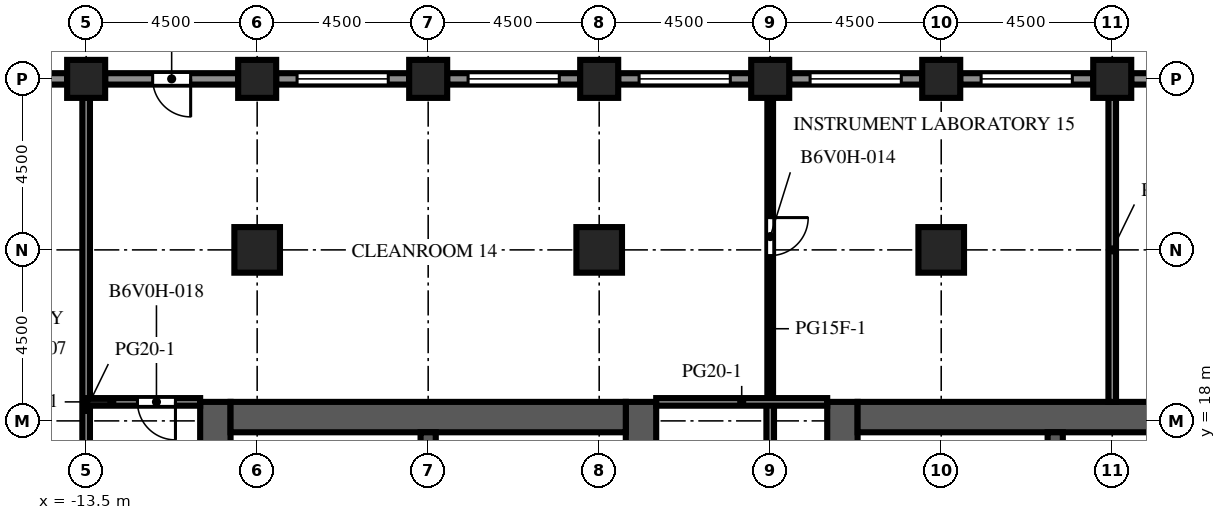
"""IFC4 building model, lengths in metres.
Left out: names, types, materials, properties, quantities, classifications, styles, units other than length and angle.
Written with IfcOpenShell. Run it as: python <this file> out.ifc"""

import sys

from ifc_helpers import new_model, si_unit, direction, frame, frame_2d, origin, origin_2d, place, context, subcontext, project, spatial, rectangle, extrude, element, fill, save


model = new_model("IFC4")
c1 = context("Model", 3, precision=1e-05, world=origin(), true_north=direction((0.0, 1.0)))
c2 = subcontext(c1, "Body", "Model", "MODEL_VIEW")
j1 = project(units=[si_unit("LENGTHUNIT", "METRE"), si_unit("PLANEANGLEUNIT", "RADIAN")], contexts=[c1])
p1 = place(None, origin())
s1 = spatial("IfcSite", under=j1, at=p1, CompositionType="ELEMENT")
p2 = place(p1, origin())
s2 = spatial("IfcBuilding", under=s1, at=p2, CompositionType="ELEMENT")
p3 = place(p2, frame((0.0, 0.0, 191.5)))
s3 = spatial("IfcBuildingStorey", under=s2, at=p3, CompositionType="ELEMENT", Elevation=191.5)
for number, where, z_axis, x_axis in (
    (1, (-13.5, 27.0, 0.0), (0.0, 0.0, 1.0), (1.0, 0.0, 0.0)),
    (2, (-9.0, 27.0, 0.0), (0.0, 0.0, 1.0), (1.0, 0.0, 0.0)),
    (3, (-4.5, 27.0, 0.0), (0.0, 0.0, 1.0), (1.0, 0.0, 0.0)),
    (4, (0.0, 27.0, 0.0), (0.0, 0.0, 1.0), (1.0, 0.0, 0.0)),
    (5, (4.5, 27.0, 0.0), (0.0, 0.0, 1.0), (1.0, 0.0, 0.0)),
    (6, (9.0, 27.0, 0.0), (0.0, 0.0, 1.0), (1.0, 0.0, 0.0)),
    (7, (13.5, 27.0, 0.0), (0.0, 0.0, 1.0), (1.0, 0.0, 0.0)),
):
    element("IfcColumn", number, at=place(p3, frame(where, z_axis=z_axis, x_axis=x_axis)), inside=s3, PredefinedType="COLUMN", context=c2, shape_type="SweptSolid", body=[
        extrude(rectangle(XDim=1.0, YDim=1.0, at=origin_2d()), origin(), (0.0, 0.0, 1.0), 4.1),
    ])
for number, where, z_axis, x_axis in (
    (8, (-9.0, 22.5, 0.0), (0.0, 0.0, 1.0), (1.0, 0.0, 0.0)),
    (9, (0.0, 22.5, 0.0), (0.0, 0.0, 1.0), (1.0, 0.0, 0.0)),
    (10, (9.0, 22.5, 0.0), (0.0, 0.0, 1.0), (1.0, 0.0, 0.0)),
):
    element("IfcColumn", number, at=place(p3, frame(where, z_axis=z_axis, x_axis=x_axis)), inside=s3, PredefinedType="COLUMN", context=c2, shape_type="SweptSolid", body=[
        extrude(rectangle(XDim=1.2, YDim=1.2, at=origin_2d()), origin(), (0.0, 0.0, 1.0), 4.1),
    ])
p4 = place(p3, frame((-10.1, -9.0, 0.0), z_axis=(0.0, 0.0, 1.0), x_axis=(0.0, 1.0, 0.0)))
e11 = element("IfcWall", 11, at=p4, inside=s3, PredefinedType="SHEAR", context=c2, shape_type="SweptSolid", body=[
    extrude(rectangle(XDim=27.5, YDim=0.8, at=frame_2d((13.75, 0.0))), origin(), (0.0, 0.0, 1.0), 4.1),
])
p5 = place(p4, frame((12.55, 0.0, 0.0)))
e12 = element("IfcOpeningElement", 12, at=p5, cuts=e11, PredefinedType="OPENING", context=c2, shape_type="SweptSolid", body=[
    extrude(rectangle(XDim=2.4, YDim=2.4, at=frame_2d((1.2, 1.2))), frame((0.0, 0.41, 0.0), z_axis=(0.0, -1.0, 0.0), x_axis=(1.0, 0.0, 0.0)), (0.0, 0.0, 1.0), 0.82),
])
p6 = place(p4, frame((6.825, 0.0, 0.0)))
e13 = element("IfcOpeningElement", 13, at=p6, cuts=e11, PredefinedType="OPENING", context=c2, shape_type="SweptSolid", body=[
    extrude(rectangle(XDim=1.2, YDim=2.1, at=frame_2d((0.6, 1.05))), frame((0.0, 0.41, 0.0), z_axis=(0.0, -1.0, 0.0), x_axis=(1.0, 0.0, 0.0)), (0.0, 0.0, 1.0), 0.82),
])
p7 = place(p4, frame((19.475, 0.0, 0.0)))
e14 = element("IfcOpeningElement", 14, at=p7, cuts=e11, PredefinedType="OPENING", context=c2, shape_type="SweptSolid", body=[
    extrude(rectangle(XDim=1.2, YDim=2.1, at=frame_2d((0.6, 1.05))), frame((0.0, 0.41, 0.0), z_axis=(0.0, -1.0, 0.0), x_axis=(1.0, 0.0, 0.0)), (0.0, 0.0, 1.0), 0.82),
])
p8 = place(p3, frame((1.1, -9.0, 0.0), z_axis=(0.0, 0.0, 1.0), x_axis=(0.0, 1.0, 0.0)))
e15 = element("IfcWall", 15, at=p8, inside=s3, PredefinedType="SHEAR", context=c2, shape_type="SweptSolid", body=[
    extrude(rectangle(XDim=27.5, YDim=0.8, at=frame_2d((13.75, 0.0))), origin(), (0.0, 0.0, 1.0), 4.1),
])
p9 = place(p8, frame((12.55, 0.0, 0.0)))
e16 = element("IfcOpeningElement", 16, at=p9, cuts=e15, PredefinedType="OPENING", context=c2, shape_type="SweptSolid", body=[
    extrude(rectangle(XDim=2.4, YDim=2.4, at=frame_2d((1.2, 1.2))), frame((0.0, 0.41, 0.0), z_axis=(0.0, -1.0, 0.0), x_axis=(1.0, 0.0, 0.0)), (0.0, 0.0, 1.0), 0.82),
])
p10 = place(p8, frame((3.95, 0.0, 0.0)))
e17 = element("IfcOpeningElement", 17, at=p10, cuts=e15, PredefinedType="OPENING", context=c2, shape_type="SweptSolid", body=[
    extrude(rectangle(XDim=1.2, YDim=2.1, at=frame_2d((0.6, 1.05))), frame((0.0, 0.41, 0.0), z_axis=(0.0, -1.0, 0.0), x_axis=(1.0, 0.0, 0.0)), (0.0, 0.0, 1.0), 0.82),
])
p11 = place(p8, frame((19.45, 0.0, 0.0)))
e18 = element("IfcOpeningElement", 18, at=p11, cuts=e15, PredefinedType="OPENING", context=c2, shape_type="SweptSolid", body=[
    extrude(rectangle(XDim=1.0, YDim=2.1, at=frame_2d((0.5, 1.05))), frame((0.0, 0.41, 0.0), z_axis=(0.0, -1.0, 0.0), x_axis=(1.0, 0.0, 0.0)), (0.0, 0.0, 1.0), 0.82),
])
p12 = place(p8, frame((21.137, 0.0, 0.0)))
e19 = element("IfcOpeningElement", 19, at=p12, cuts=e15, PredefinedType="OPENING", context=c2, shape_type="SweptSolid", body=[
    extrude(rectangle(XDim=1.0, YDim=2.1, at=frame_2d((0.5, 1.05))), frame((0.0, 0.41, 0.0), z_axis=(0.0, -1.0, 0.0), x_axis=(1.0, 0.0, 0.0)), (0.0, 0.0, 1.0), 0.82),
])
p13 = place(p8, frame((23.2, 0.0, 0.0)))
e20 = element("IfcOpeningElement", 20, at=p13, cuts=e15, PredefinedType="OPENING", context=c2, shape_type="SweptSolid", body=[
    extrude(rectangle(XDim=1.0, YDim=2.1, at=frame_2d((0.5, 1.05))), frame((0.0, 0.41, 0.0), z_axis=(0.0, -1.0, 0.0), x_axis=(1.0, 0.0, 0.0)), (0.0, 0.0, 1.0), 0.82),
])
p14 = place(p8, frame((25.262, 0.0, 0.0)))
e21 = element("IfcOpeningElement", 21, at=p14, cuts=e15, PredefinedType="OPENING", context=c2, shape_type="SweptSolid", body=[
    extrude(rectangle(XDim=1.0, YDim=2.1, at=frame_2d((0.5, 1.05))), frame((0.0, 0.41, 0.0), z_axis=(0.0, -1.0, 0.0), x_axis=(1.0, 0.0, 0.0)), (0.0, 0.0, 1.0), 0.82),
])
p15 = place(p3, frame((-9.7, 18.1, 0.0), z_axis=(0.0, 0.0, 1.0), x_axis=(1.0, 0.0, 0.0)))
e22 = element("IfcWall", 22, at=p15, inside=s3, PredefinedType="SHEAR", context=c2, shape_type="SweptSolid", body=[
    extrude(rectangle(XDim=10.4, YDim=0.8, at=frame_2d((5.2, 0.0))), origin(), (0.0, 0.0, 1.0), 4.1),
])
p16 = place(p3, frame((-4.5, 10.2, 0.0), z_axis=(0.0, 0.0, 1.0), x_axis=(0.0, 1.0, 0.0)))
e23 = element("IfcWall", 23, at=p16, inside=s3, PredefinedType="SHEAR", context=c2, shape_type="SweptSolid", body=[
    extrude(rectangle(XDim=7.5, YDim=0.4, at=frame_2d((3.75, 0.0))), origin(), (0.0, 0.0, 1.0), 4.1),
])
p17 = place(p3, frame((6.4, -9.0, 0.0), z_axis=(0.0, 0.0, 1.0), x_axis=(0.0, 1.0, 0.0)))
e24 = element("IfcWall", 24, at=p17, inside=s3, PredefinedType="SHEAR", context=c2, shape_type="SweptSolid", body=[
    extrude(rectangle(XDim=27.5, YDim=0.8, at=frame_2d((13.75, 0.0))), origin(), (0.0, 0.0, 1.0), 4.1),
])
p18 = place(p17, frame((12.55, 0.0, 0.0)))
e25 = element("IfcOpeningElement", 25, at=p18, cuts=e24, PredefinedType="OPENING", context=c2, shape_type="SweptSolid", body=[
    extrude(rectangle(XDim=2.4, YDim=2.4, at=frame_2d((1.2, 1.2))), frame((0.0, 0.41, 0.0), z_axis=(0.0, -1.0, 0.0), x_axis=(1.0, 0.0, 0.0)), (0.0, 0.0, 1.0), 0.82),
])
p19 = place(p17, frame((3.95, 0.0, 0.0)))
e26 = element("IfcOpeningElement", 26, at=p19, cuts=e24, PredefinedType="OPENING", context=c2, shape_type="SweptSolid", body=[
    extrude(rectangle(XDim=1.2, YDim=2.1, at=frame_2d((0.6, 1.05))), frame((0.0, 0.41, 0.0), z_axis=(0.0, -1.0, 0.0), x_axis=(1.0, 0.0, 0.0)), (0.0, 0.0, 1.0), 0.82),
])
p20 = place(p17, frame((19.45, 0.0, 0.0)))
e27 = element("IfcOpeningElement", 27, at=p20, cuts=e24, PredefinedType="OPENING", context=c2, shape_type="SweptSolid", body=[
    extrude(rectangle(XDim=1.0, YDim=2.1, at=frame_2d((0.5, 1.05))), frame((0.0, 0.41, 0.0), z_axis=(0.0, -1.0, 0.0), x_axis=(1.0, 0.0, 0.0)), (0.0, 0.0, 1.0), 0.82),
])
p21 = place(p17, frame((21.137, 0.0, 0.0)))
e28 = element("IfcOpeningElement", 28, at=p21, cuts=e24, PredefinedType="OPENING", context=c2, shape_type="SweptSolid", body=[
    extrude(rectangle(XDim=1.0, YDim=2.1, at=frame_2d((0.5, 1.05))), frame((0.0, 0.41, 0.0), z_axis=(0.0, -1.0, 0.0), x_axis=(1.0, 0.0, 0.0)), (0.0, 0.0, 1.0), 0.82),
])
p22 = place(p17, frame((23.2, 0.0, 0.0)))
e29 = element("IfcOpeningElement", 29, at=p22, cuts=e24, PredefinedType="OPENING", context=c2, shape_type="SweptSolid", body=[
    extrude(rectangle(XDim=1.0, YDim=2.1, at=frame_2d((0.5, 1.05))), frame((0.0, 0.41, 0.0), z_axis=(0.0, -1.0, 0.0), x_axis=(1.0, 0.0, 0.0)), (0.0, 0.0, 1.0), 0.82),
])
p23 = place(p17, frame((25.262, 0.0, 0.0)))
e30 = element("IfcOpeningElement", 30, at=p23, cuts=e24, PredefinedType="OPENING", context=c2, shape_type="SweptSolid", body=[
    extrude(rectangle(XDim=1.0, YDim=2.1, at=frame_2d((0.5, 1.05))), frame((0.0, 0.41, 0.0), z_axis=(0.0, -1.0, 0.0), x_axis=(1.0, 0.0, 0.0)), (0.0, 0.0, 1.0), 0.82),
])
p24 = place(p3, frame((6.8, 18.1, 0.0), z_axis=(0.0, 0.0, 1.0), x_axis=(1.0, 0.0, 0.0)))
e31 = element("IfcWall", 31, at=p24, inside=s3, PredefinedType="SHEAR", context=c2, shape_type="SweptSolid", body=[
    extrude(rectangle(XDim=10.4, YDim=0.8, at=frame_2d((5.2, 0.0))), origin(), (0.0, 0.0, 1.0), 4.1),
])
p25 = place(p3, frame((12.0, 10.2, 0.0), z_axis=(0.0, 0.0, 1.0), x_axis=(0.0, 1.0, 0.0)))
e32 = element("IfcWall", 32, at=p25, inside=s3, PredefinedType="SHEAR", context=c2, shape_type="SweptSolid", body=[
    extrude(rectangle(XDim=7.5, YDim=0.4, at=frame_2d((3.75, 0.0))), origin(), (0.0, 0.0, 1.0), 4.1),
])
p26 = place(p3, frame((14.0, 27.0, 0.0), z_axis=(0.0, 0.0, 1.0), x_axis=(1.0, 0.0, 0.0)))
e33 = element("IfcWall", 33, at=p26, inside=s3, PredefinedType="SOLIDWALL", context=c2, shape_type="SweptSolid", body=[
    extrude(rectangle(XDim=3.5, YDim=0.3, at=frame_2d((1.75, 0.0))), origin(), (0.0, 0.0, 1.0), 2.85),
])
p27 = place(p26, frame((0.55, 0.0, 0.8)))
e34 = element("IfcOpeningElement", 34, at=p27, cuts=e33, PredefinedType="OPENING", context=c2, shape_type="SweptSolid", body=[
    extrude(rectangle(XDim=2.4, YDim=1.7, at=frame_2d((1.2, 0.85))), frame((0.0, 0.16, 0.0), z_axis=(0.0, -1.0, 0.0), x_axis=(1.0, 0.0, 0.0)), (0.0, 0.0, 1.0), 0.32),
])
p28 = place(p3, frame((9.5, 27.0, 0.0), z_axis=(0.0, 0.0, 1.0), x_axis=(1.0, 0.0, 0.0)))
e35 = element("IfcWall", 35, at=p28, inside=s3, PredefinedType="SOLIDWALL", context=c2, shape_type="SweptSolid", body=[
    extrude(rectangle(XDim=3.5, YDim=0.3, at=frame_2d((1.75, 0.0))), origin(), (0.0, 0.0, 1.0), 2.85),
])
p29 = place(p28, frame((0.55, 0.0, 0.8)))
e36 = element("IfcOpeningElement", 36, at=p29, cuts=e35, PredefinedType="OPENING", context=c2, shape_type="SweptSolid", body=[
    extrude(rectangle(XDim=2.4, YDim=1.7, at=frame_2d((1.2, 0.85))), frame((0.0, 0.16, 0.0), z_axis=(0.0, -1.0, 0.0), x_axis=(1.0, 0.0, 0.0)), (0.0, 0.0, 1.0), 0.32),
])
p30 = place(p3, frame((5.0, 27.0, 0.0), z_axis=(0.0, 0.0, 1.0), x_axis=(1.0, 0.0, 0.0)))
e37 = element("IfcWall", 37, at=p30, inside=s3, PredefinedType="SOLIDWALL", context=c2, shape_type="SweptSolid", body=[
    extrude(rectangle(XDim=3.5, YDim=0.3, at=frame_2d((1.75, 0.0))), origin(), (0.0, 0.0, 1.0), 2.85),
])
p31 = place(p30, frame((0.55, 0.0, 0.8)))
e38 = element("IfcOpeningElement", 38, at=p31, cuts=e37, PredefinedType="OPENING", context=c2, shape_type="SweptSolid", body=[
    extrude(rectangle(XDim=2.4, YDim=1.7, at=frame_2d((1.2, 0.85))), frame((0.0, 0.16, 0.0), z_axis=(0.0, -1.0, 0.0), x_axis=(1.0, 0.0, 0.0)), (0.0, 0.0, 1.0), 0.32),
])
p32 = place(p3, frame((0.5, 27.0, 0.0), z_axis=(0.0, 0.0, 1.0), x_axis=(1.0, 0.0, 0.0)))
e39 = element("IfcWall", 39, at=p32, inside=s3, PredefinedType="SOLIDWALL", context=c2, shape_type="SweptSolid", body=[
    extrude(rectangle(XDim=3.5, YDim=0.3, at=frame_2d((1.75, 0.0))), origin(), (0.0, 0.0, 1.0), 2.85),
])
p33 = place(p32, frame((0.55, 0.0, 0.8)))
e40 = element("IfcOpeningElement", 40, at=p33, cuts=e39, PredefinedType="OPENING", context=c2, shape_type="SweptSolid", body=[
    extrude(rectangle(XDim=2.4, YDim=1.7, at=frame_2d((1.2, 0.85))), frame((0.0, 0.16, 0.0), z_axis=(0.0, -1.0, 0.0), x_axis=(1.0, 0.0, 0.0)), (0.0, 0.0, 1.0), 0.32),
])
p34 = place(p3, frame((-4.0, 27.0, 0.0), z_axis=(0.0, 0.0, 1.0), x_axis=(1.0, 0.0, 0.0)))
e41 = element("IfcWall", 41, at=p34, inside=s3, PredefinedType="SOLIDWALL", context=c2, shape_type="SweptSolid", body=[
    extrude(rectangle(XDim=3.5, YDim=0.3, at=frame_2d((1.75, 0.0))), origin(), (0.0, 0.0, 1.0), 2.85),
])
p35 = place(p34, frame((0.55, 0.0, 0.8)))
e42 = element("IfcOpeningElement", 42, at=p35, cuts=e41, PredefinedType="OPENING", context=c2, shape_type="SweptSolid", body=[
    extrude(rectangle(XDim=2.4, YDim=1.7, at=frame_2d((1.2, 0.85))), frame((0.0, 0.16, 0.0), z_axis=(0.0, -1.0, 0.0), x_axis=(1.0, 0.0, 0.0)), (0.0, 0.0, 1.0), 0.32),
])
p36 = place(p3, frame((-8.5, 27.0, 0.0), z_axis=(0.0, 0.0, 1.0), x_axis=(1.0, 0.0, 0.0)))
e43 = element("IfcWall", 43, at=p36, inside=s3, PredefinedType="SOLIDWALL", context=c2, shape_type="SweptSolid", body=[
    extrude(rectangle(XDim=3.5, YDim=0.3, at=frame_2d((1.75, 0.0))), origin(), (0.0, 0.0, 1.0), 2.85),
])
p37 = place(p36, frame((0.55, 0.0, 0.8)))
e44 = element("IfcOpeningElement", 44, at=p37, cuts=e43, PredefinedType="OPENING", context=c2, shape_type="SweptSolid", body=[
    extrude(rectangle(XDim=2.4, YDim=1.7, at=frame_2d((1.2, 0.85))), frame((0.0, 0.16, 0.0), z_axis=(0.0, -1.0, 0.0), x_axis=(1.0, 0.0, 0.0)), (0.0, 0.0, 1.0), 0.32),
])
p38 = place(p3, frame((-13.0, 27.0, 0.0), z_axis=(0.0, 0.0, 1.0), x_axis=(1.0, 0.0, 0.0)))
e45 = element("IfcWall", 45, at=p38, inside=s3, PredefinedType="SOLIDWALL", context=c2, shape_type="SweptSolid", body=[
    extrude(rectangle(XDim=3.5, YDim=0.3, at=frame_2d((1.75, 0.0))), origin(), (0.0, 0.0, 1.0), 2.85),
])
p39 = place(p38, frame((1.25, 0.0, 0.0)))
e46 = element("IfcOpeningElement", 46, at=p39, cuts=e45, PredefinedType="OPENING", context=c2, shape_type="SweptSolid", body=[
    extrude(rectangle(XDim=1.0, YDim=2.2, at=frame_2d((0.5, 1.1))), frame((0.0, 0.16, 0.0), z_axis=(0.0, -1.0, 0.0), x_axis=(1.0, 0.0, 0.0)), (0.0, 0.0, 1.0), 0.32),
])
p40 = place(p3, frame((-17.5, 27.0, 0.0), z_axis=(0.0, 0.0, 1.0), x_axis=(1.0, 0.0, 0.0)))
e47 = element("IfcWall", 47, at=p40, inside=s3, PredefinedType="SOLIDWALL", context=c2, shape_type="SweptSolid", body=[
    extrude(rectangle(XDim=3.5, YDim=0.3, at=frame_2d((1.75, 0.0))), origin(), (0.0, 0.0, 1.0), 2.85),
])
p41 = place(p40, frame((0.55, 0.0, 0.8)))
e48 = element("IfcOpeningElement", 48, at=p41, cuts=e47, PredefinedType="OPENING", context=c2, shape_type="SweptSolid", body=[
    extrude(rectangle(XDim=2.4, YDim=1.7, at=frame_2d((1.2, 0.85))), frame((0.0, 0.16, 0.0), z_axis=(0.0, -1.0, 0.0), x_axis=(1.0, 0.0, 0.0)), (0.0, 0.0, 1.0), 0.32),
])
p42 = place(p3, frame((-13.5, 6.25, 0.0), z_axis=(0.0, 0.0, 1.0), x_axis=(0.0, 1.0, 0.0)))
e49 = element("IfcWall", 49, at=p42, inside=s3, PredefinedType="PARTITIONING", context=c2, shape_type="SweptSolid", body=[
    extrude(rectangle(XDim=20.25, YDim=0.2, at=frame_2d((10.125, 0.0))), origin(), (0.0, 0.0, 1.0), 3.65),
])
p43 = place(p42, frame((2.85, 0.0, 0.0)))
e50 = element("IfcOpeningElement", 50, at=p43, cuts=e49, PredefinedType="OPENING", context=c2, shape_type="SweptSolid", body=[
    extrude(rectangle(XDim=1.0, YDim=2.1, at=frame_2d((0.5, 1.05))), frame((0.0, 0.11, 0.0), z_axis=(0.0, -1.0, 0.0), x_axis=(1.0, 0.0, 0.0)), (0.0, 0.0, 1.0), 0.22),
])
p44 = place(p3, frame((4.5, 26.5, 0.0), z_axis=(0.0, 0.0, 1.0), x_axis=(0.0, -1.0, 0.0)))
e51 = element("IfcWall", 51, at=p44, inside=s3, PredefinedType="PARTITIONING", context=c2, shape_type="SweptSolid", body=[
    extrude(rectangle(XDim=8.0, YDim=0.15, at=frame_2d((4.0, 0.0))), origin(), (0.0, 0.0, 1.0), 3.65),
])
p45 = place(p44, frame((3.15, 0.0, 0.0)))
e52 = element("IfcOpeningElement", 52, at=p45, cuts=e51, PredefinedType="OPENING", context=c2, shape_type="SweptSolid", body=[
    extrude(rectangle(XDim=1.0, YDim=2.1, at=frame_2d((0.5, 1.05))), frame((0.0, 0.085, 0.0), z_axis=(0.0, -1.0, 0.0), x_axis=(1.0, 0.0, 0.0)), (0.0, 0.0, 1.0), 0.17),
])
p46 = place(p3, frame((4.5, 18.5, 0.0), z_axis=(0.0, 0.0, 1.0), x_axis=(0.0, -1.0, 0.0)))
e53 = element("IfcWall", 53, at=p46, inside=s3, PredefinedType="PARTITIONING", context=c2, shape_type="SweptSolid", body=[
    extrude(rectangle(XDim=11.8, YDim=0.2, at=frame_2d((5.9, 0.0))), origin(), (0.0, 0.0, 1.0), 3.65),
])
p47 = place(p46, frame((5.45, 0.0, 0.0)))
e54 = element("IfcOpeningElement", 54, at=p47, cuts=e53, PredefinedType="OPENING", context=c2, shape_type="SweptSolid", body=[
    extrude(rectangle(XDim=1.0, YDim=2.1, at=frame_2d((0.5, 1.05))), frame((0.0, 0.11, 0.0), z_axis=(0.0, -1.0, 0.0), x_axis=(1.0, 0.0, 0.0)), (0.0, 0.0, 1.0), 0.22),
])
p48 = place(p3, frame((13.5, 18.5, 0.0), z_axis=(0.0, 0.0, 1.0), x_axis=(0.0, 1.0, 0.0)))
e55 = element("IfcWall", 55, at=p48, inside=s3, PredefinedType="PARTITIONING", context=c2, shape_type="SweptSolid", body=[
    extrude(rectangle(XDim=8.0, YDim=0.2, at=frame_2d((4.0, 0.0))), origin(), (0.0, 0.0, 1.0), 3.65),
])
p49 = place(p3, frame((-13.5, 18.5, 0.0), z_axis=(0.0, 0.0, 1.0), x_axis=(1.0, 0.0, 0.0)))
e56 = element("IfcWall", 56, at=p49, inside=s3, PredefinedType="PARTITIONING", context=c2, shape_type="SweptSolid", body=[
    extrude(rectangle(XDim=3.0, YDim=0.2, at=frame_2d((1.5, 0.0))), origin(), (0.0, 0.0, 1.0), 3.65),
])
p50 = place(p49, frame((1.35, 0.0, 0.0)))
e57 = element("IfcOpeningElement", 57, at=p50, cuts=e56, PredefinedType="OPENING", context=c2, shape_type="SweptSolid", body=[
    extrude(rectangle(XDim=1.0, YDim=2.1, at=frame_2d((0.5, 1.05))), frame((0.0, 0.11, 0.0), z_axis=(0.0, -1.0, 0.0), x_axis=(1.0, 0.0, 0.0)), (0.0, 0.0, 1.0), 0.22),
])
p51 = place(p3, frame((1.5, 18.5, 0.0), z_axis=(0.0, 0.0, 1.0), x_axis=(1.0, 0.0, 0.0)))
e58 = element("IfcWall", 58, at=p51, inside=s3, PredefinedType="PARTITIONING", context=c2, shape_type="SweptSolid", body=[
    extrude(rectangle(XDim=4.5, YDim=0.2, at=frame_2d((2.25, 0.0))), origin(), (0.0, 0.0, 1.0), 3.65),
])
p52 = place(p29, origin())
e59 = element("IfcWindow", 59, at=p52, inside=s3, PartitioningType="SINGLE_PANEL", PredefinedType="WINDOW", context=c2, shape_type="SweptSolid", body=[
    extrude(rectangle(XDim=2.4, YDim=1.7, at=frame_2d((1.2, 0.85))), frame((0.0, 0.03, 0.0), z_axis=(0.0, -1.0, 0.0), x_axis=(1.0, 0.0, 0.0)), (0.0, 0.0, 1.0), 0.06),
])
fill(e36, e59)
p53 = place(p31, origin())
e60 = element("IfcWindow", 60, at=p53, inside=s3, PartitioningType="SINGLE_PANEL", PredefinedType="WINDOW", context=c2, shape_type="SweptSolid", body=[
    extrude(rectangle(XDim=2.4, YDim=1.7, at=frame_2d((1.2, 0.85))), frame((0.0, 0.03, 0.0), z_axis=(0.0, -1.0, 0.0), x_axis=(1.0, 0.0, 0.0)), (0.0, 0.0, 1.0), 0.06),
])
fill(e38, e60)
p54 = place(p33, origin())
e61 = element("IfcWindow", 61, at=p54, inside=s3, PartitioningType="SINGLE_PANEL", PredefinedType="WINDOW", context=c2, shape_type="SweptSolid", body=[
    extrude(rectangle(XDim=2.4, YDim=1.7, at=frame_2d((1.2, 0.85))), frame((0.0, 0.03, 0.0), z_axis=(0.0, -1.0, 0.0), x_axis=(1.0, 0.0, 0.0)), (0.0, 0.0, 1.0), 0.06),
])
fill(e40, e61)
p55 = place(p35, origin())
e62 = element("IfcWindow", 62, at=p55, inside=s3, PartitioningType="SINGLE_PANEL", PredefinedType="WINDOW", context=c2, shape_type="SweptSolid", body=[
    extrude(rectangle(XDim=2.4, YDim=1.7, at=frame_2d((1.2, 0.85))), frame((0.0, 0.03, 0.0), z_axis=(0.0, -1.0, 0.0), x_axis=(1.0, 0.0, 0.0)), (0.0, 0.0, 1.0), 0.06),
])
fill(e42, e62)
p56 = place(p37, origin())
e63 = element("IfcWindow", 63, at=p56, inside=s3, PartitioningType="SINGLE_PANEL", PredefinedType="WINDOW", context=c2, shape_type="SweptSolid", body=[
    extrude(rectangle(XDim=2.4, YDim=1.7, at=frame_2d((1.2, 0.85))), frame((0.0, 0.03, 0.0), z_axis=(0.0, -1.0, 0.0), x_axis=(1.0, 0.0, 0.0)), (0.0, 0.0, 1.0), 0.06),
])
fill(e44, e63)
p57 = place(p39, origin())
e64 = element("IfcDoor", 64, at=p57, inside=s3, OperationType="SINGLE_SWING_RIGHT", PredefinedType="DOOR", context=c2, shape_type="SweptSolid", body=[
    extrude(rectangle(XDim=1.0, YDim=2.2, at=frame_2d((0.5, 1.1))), frame((0.0, 0.025, 0.0), z_axis=(0.0, -1.0, 0.0), x_axis=(1.0, 0.0, 0.0)), (0.0, 0.0, 1.0), 0.05),
])
fill(e46, e64)
p58 = place(p45, origin())
e65 = element("IfcDoor", 65, at=p58, inside=s3, OperationType="SINGLE_SWING_LEFT", PredefinedType="DOOR", context=c2, shape_type="SweptSolid", body=[
    extrude(rectangle(XDim=1.0, YDim=2.1, at=frame_2d((0.5, 1.05))), frame((0.0, 0.025, 0.0), z_axis=(0.0, -1.0, 0.0), x_axis=(1.0, 0.0, 0.0)), (0.0, 0.0, 1.0), 0.05),
])
fill(e52, e65)
p59 = place(p50, origin())
e66 = element("IfcDoor", 66, at=p59, inside=s3, OperationType="SINGLE_SWING_RIGHT", PredefinedType="DOOR", context=c2, shape_type="SweptSolid", body=[
    extrude(rectangle(XDim=1.0, YDim=2.1, at=frame_2d((0.5, 1.05))), frame((0.0, 0.025, 0.0), z_axis=(0.0, -1.0, 0.0), x_axis=(1.0, 0.0, 0.0)), (0.0, 0.0, 1.0), 0.05),
])
fill(e57, e66)
save(model, sys.argv[1])
